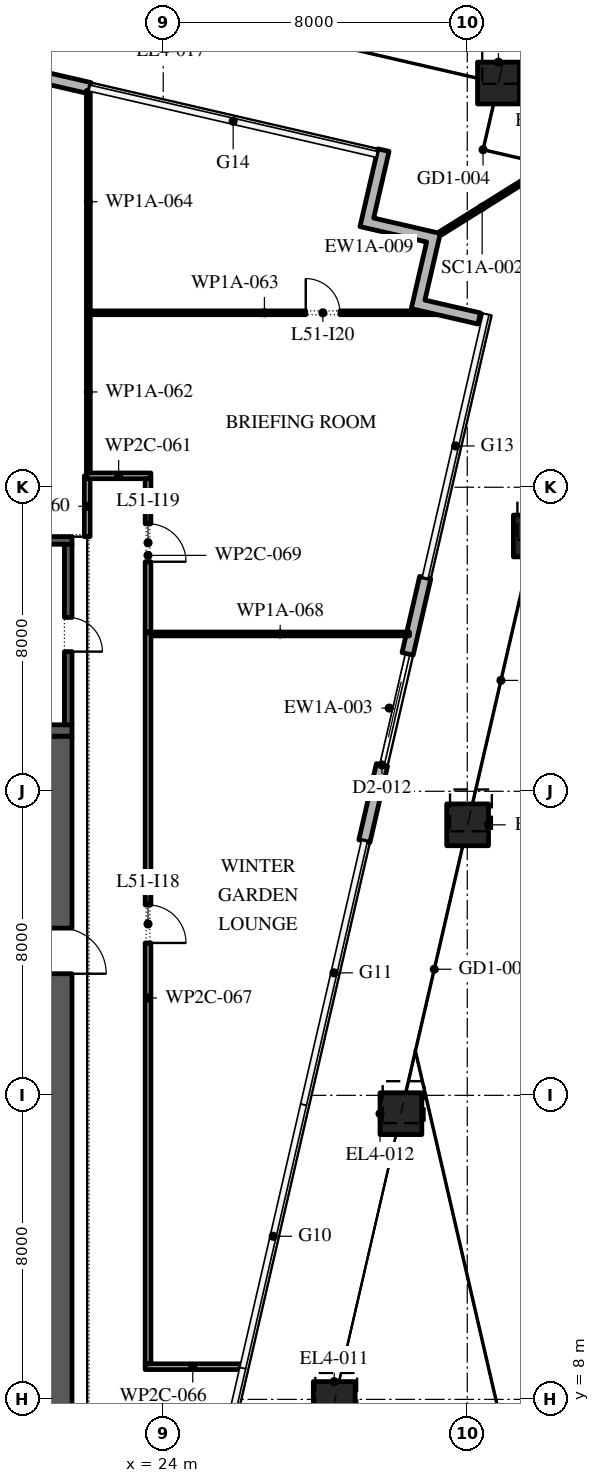
"""IFC4 building model, lengths in metres.
Left out: names, types, materials, properties, quantities, classifications, styles, units other than length and angle.
Written with IfcOpenShell. Run it as: python <this file> out.ifc"""

import sys

from ifc_helpers import new_model, si_unit, direction, frame, frame_2d, origin, origin_2d, place, context, subcontext, project, spatial, polyline, rectangle, outline, extrude, element, fill, save


model = new_model("IFC4")
c1 = context("Model", 3, precision=1e-05, world=origin(), true_north=direction((0.0, 1.0)))
c2 = subcontext(c1, "Body", "Model", "MODEL_VIEW")
j1 = project(units=[si_unit("LENGTHUNIT", "METRE"), si_unit("PLANEANGLEUNIT", "RADIAN")], contexts=[c1])
p1 = place(None, origin())
s1 = spatial("IfcSite", under=j1, at=p1, CompositionType="ELEMENT")
p2 = place(p1, origin())
s2 = spatial("IfcBuilding", under=s1, at=p2, CompositionType="ELEMENT")
p3 = place(p2, frame((0.0, 0.0, 237.0)))
s3 = spatial("IfcBuildingStorey", under=s2, at=p3, CompositionType="ELEMENT", Elevation=237.0)
p4 = place(p3, frame((28.5, 7.918, 0.0), z_axis=(0.008741740851, 0.037935089368, 0.999241968175), x_axis=(-0.974461559539, 0.224554378672, 0.0)))
e1 = element("IfcColumn", 1, at=p4, inside=s3, PredefinedType="COLUMN", context=c2, shape_type="SweptSolid", body=[
    extrude(rectangle(XDim=1.1, YDim=1.1, at=origin_2d()), origin(), (0.0, 0.0, 1.0), 6.005),
])
p5 = place(p3, frame((30.255, 15.518, 0.0), z_axis=(0.01166233446, 0.050550327764, 0.998653420521), x_axis=(-0.974404395419, 0.224802300229, 0.0)))
e2 = element("IfcColumn", 2, at=p5, inside=s3, PredefinedType="COLUMN", context=c2, shape_type="SweptSolid", body=[
    extrude(rectangle(XDim=1.1, YDim=1.1, at=origin_2d()), origin(), (0.0, 0.0, 1.0), 6.008),
])
p6 = place(p3, frame((32.009, 23.118, 0.0), z_axis=(0.014536448965, 0.063140162405, 0.997898798247), x_axis=(-0.974507250238, 0.224356010023, 0.0)))
e3 = element("IfcColumn", 3, at=p6, inside=s3, PredefinedType="COLUMN", context=c2, shape_type="SweptSolid", body=[
    extrude(rectangle(XDim=1.1, YDim=1.1, at=origin_2d()), origin(), (0.0, 0.0, 1.0), 6.013),
])
p7 = place(p3, frame((33.764, 30.718, 0.0), z_axis=(0.017443872675, 0.075698293979, 0.996978174081), x_axis=(-0.974461559539, 0.224554378672, 0.0)))
e4 = element("IfcColumn", 4, at=p7, inside=s3, PredefinedType="COLUMN", context=c2, shape_type="SweptSolid", body=[
    extrude(rectangle(XDim=1.1, YDim=1.1, at=origin_2d()), origin(), (0.0, 0.0, 1.0), 6.018),
])
p8 = place(p3, frame((32.821, 42.635, 0.0), z_axis=(0.020342549083, 0.088218584371, 0.995893398948), x_axis=(-0.97442890123, 0.224696053476, 0.0)))
e5 = element("IfcColumn", 5, at=p8, inside=s3, PredefinedType="COLUMN", context=c2, shape_type="SweptSolid", body=[
    extrude(rectangle(XDim=1.1, YDim=1.1, at=origin_2d()), origin(), (0.0, 0.0, 1.0), 6.025),
])
p9 = place(p3, frame((29.293, 22.689, 0.0), z_axis=(0.0, 0.0, 1.0), x_axis=(0.224949733175, 0.9743703698, 0.0)))
e6 = element("IfcWall", 6, at=p9, inside=s3, PredefinedType="STANDARD", context=c2, shape_type="SweptSolid", body=[
    extrude(rectangle(XDim=7.114, YDim=0.3, at=frame_2d((3.557, 0.0))), origin(), (0.0, 0.0, 1.0), 5.8),
])
p10 = place(p9, frame((2.057, 0.0, 0.0)))
e7 = element("IfcOpeningElement", 7, at=p10, cuts=e6, PredefinedType="OPENING", context=c2, shape_type="SweptSolid", body=[
    extrude(rectangle(XDim=3.0, YDim=3.5, at=frame_2d((1.5, 1.75))), frame((0.0, 0.16, 0.0), z_axis=(0.0, -1.0, 0.0), x_axis=(1.0, 0.0, 0.0)), (0.0, 0.0, 1.0), 0.32),
])
p11 = place(p3, frame((22.065, 42.502, 0.0), z_axis=(0.0, 0.0, 1.0), x_axis=(-0.974372279954, 0.224941459176, 0.0)))
e8 = element("IfcWall", 8, at=p11, inside=s3, PredefinedType="STANDARD", context=c2, shape_type="SweptSolid", body=[
    extrude(rectangle(XDim=8.05, YDim=0.3, at=frame_2d((4.025, 0.0))), origin(), (0.0, 0.0, 1.0), 5.8),
])
p12 = place(p11, frame((1.625, 0.0, 0.0)))
e9 = element("IfcOpeningElement", 9, at=p12, cuts=e8, PredefinedType="OPENING", context=c2, shape_type="SweptSolid", body=[
    extrude(rectangle(XDim=3.0, YDim=3.5, at=frame_2d((1.5, 1.75))), frame((0.0, 0.16, 0.0), z_axis=(0.0, -1.0, 0.0), x_axis=(1.0, 0.0, 0.0)), (0.0, 0.0, 1.0), 0.32),
])
p13 = place(p3, origin())
e10 = element("IfcWall", 10, at=p13, inside=s3, PredefinedType="STANDARD", context=c2, shape_type="SweptSolid", body=[
    extrude(outline(polyline([(30.931, 38.453), (29.177, 38.858), (29.65, 40.905), (29.942, 40.837), (29.537, 39.083), (31.291, 38.678), (30.886, 36.924), (32.348, 36.587), (32.28, 36.295), (30.526, 36.699), (30.931, 38.453)])), origin(), (0.0, 0.0, 1.0), 5.8),
])
p14 = place(p3, frame((31.291, 38.678, 0.0), z_axis=(0.0, 0.0, 1.0), x_axis=(0.84807753525, 0.529872148923, 0.0)))
e11 = element("IfcWall", 11, at=p14, inside=s3, PredefinedType="STANDARD", context=c2, shape_type="SweptSolid", body=[
    extrude(rectangle(XDim=2.596, YDim=0.1, at=frame_2d((1.298, 0.0))), origin(), (0.0, 0.0, 1.0), 5.8),
])
p15 = place(p3, frame((21.3, -2.45, 0.0), z_axis=(0.0, 0.0, 1.0), x_axis=(0.0, 1.0, 0.0)))
e12 = element("IfcWall", 12, at=p15, inside=s3, PredefinedType="SHEAR", context=c2, shape_type="SweptSolid", body=[
    extrude(rectangle(XDim=27.9, YDim=0.6, at=frame_2d((13.95, 0.0))), origin(), (0.0, 0.0, 1.0), 5.8),
])
p16 = place(p15, frame((5.05, 0.0, 0.0)))
e13 = element("IfcOpeningElement", 13, at=p16, cuts=e12, PredefinedType="OPENING", context=c2, shape_type="SweptSolid", body=[
    extrude(rectangle(XDim=1.2, YDim=2.1, at=frame_2d((0.6, 1.05))), frame((0.0, 0.31, 0.0), z_axis=(0.0, -1.0, 0.0), x_axis=(1.0, 0.0, 0.0)), (0.0, 0.0, 1.0), 0.62),
])
p17 = place(p15, frame((21.65, 0.0, 0.0)))
e14 = element("IfcOpeningElement", 14, at=p17, cuts=e12, PredefinedType="OPENING", context=c2, shape_type="SweptSolid", body=[
    extrude(rectangle(XDim=1.2, YDim=2.1, at=frame_2d((0.6, 1.05))), frame((0.0, 0.31, 0.0), z_axis=(0.0, -1.0, 0.0), x_axis=(1.0, 0.0, 0.0)), (0.0, 0.0, 1.0), 0.62),
])
p18 = place(p3, frame((10.4, 25.6, 0.0), z_axis=(0.0, 0.0, 1.0), x_axis=(1.0, 0.0, 0.0)))
e15 = element("IfcWall", 15, at=p18, inside=s3, PredefinedType="SHEAR", context=c2, shape_type="SweptSolid", body=[
    extrude(rectangle(XDim=11.2, YDim=0.3, at=frame_2d((5.6, 0.0))), origin(), (0.0, 0.0, 1.0), 5.8),
])
p19 = place(p3, frame((21.5, 25.75, 0.0), z_axis=(0.0, 0.0, 1.0), x_axis=(0.0, 1.0, 0.0)))
e16 = element("IfcWall", 16, at=p19, inside=s3, PredefinedType="SHEAR", context=c2, shape_type="SweptSolid", body=[
    extrude(rectangle(XDim=4.75, YDim=0.2, at=frame_2d((2.375, 0.0))), origin(), (0.0, 0.0, 1.0), 5.8),
])
p20 = place(p19, frame((1.925, 0.0, 0.0)))
e17 = element("IfcOpeningElement", 17, at=p20, cuts=e16, PredefinedType="OPENING", context=c2, shape_type="SweptSolid", body=[
    extrude(rectangle(XDim=0.9, YDim=2.1, at=frame_2d((0.45, 1.05))), frame((0.0, 0.11, 0.0), z_axis=(0.0, -1.0, 0.0), x_axis=(1.0, 0.0, 0.0)), (0.0, 0.0, 1.0), 0.22),
])
p21 = place(p3, frame((10.4, 30.6, 0.0), z_axis=(0.0, 0.0, 1.0), x_axis=(1.0, 0.0, 0.0)))
e18 = element("IfcWall", 18, at=p21, inside=s3, PredefinedType="SHEAR", context=c2, shape_type="SweptSolid", body=[
    extrude(rectangle(XDim=11.2, YDim=0.2, at=frame_2d((5.6, 0.0))), origin(), (0.0, 0.0, 1.0), 5.8),
])
p22 = place(p3, frame((22.0, 30.7, 0.0), z_axis=(0.0, 0.0, 1.0), x_axis=(0.0, 1.0, 0.0)))
e19 = element("IfcWall", 19, at=p22, inside=s3, PredefinedType="PARTITIONING", context=c2, shape_type="SweptSolid", body=[
    extrude(rectangle(XDim=1.6, YDim=0.15, at=frame_2d((0.8, 0.0))), origin(), (0.0, 0.0, 1.0), 5.8),
])
p23 = place(p3, frame((21.98, 32.3, 0.0), z_axis=(0.0, 0.0, 1.0), x_axis=(1.0, 0.0, 0.0)))
e20 = element("IfcWall", 20, at=p23, inside=s3, PredefinedType="PARTITIONING", context=c2, shape_type="SweptSolid", body=[
    extrude(rectangle(XDim=1.695, YDim=0.15, at=frame_2d((0.848, 0.0))), origin(), (0.0, 0.0, 1.0), 5.8),
])
p24 = place(p3, frame((22.03, 36.64, 0.0), z_axis=(0.0, 0.0, 1.0), x_axis=(0.0, -1.0, 0.0)))
e21 = element("IfcWall", 21, at=p24, inside=s3, PredefinedType="PARTITIONING", context=c2, shape_type="SweptSolid", body=[
    extrude(rectangle(XDim=4.265, YDim=0.1, at=frame_2d((2.132, 0.0))), origin(), (0.0, 0.0, 1.0), 5.8),
])
p25 = place(p3, frame((22.08, 36.59, 0.0), z_axis=(0.0, 0.0, 1.0), x_axis=(1.0, 0.0, 0.0)))
e22 = element("IfcWall", 22, at=p25, inside=s3, PredefinedType="PARTITIONING", context=c2, shape_type="SweptSolid", body=[
    extrude(rectangle(XDim=9.165, YDim=0.1, at=frame_2d((4.583, 0.0))), origin(), (0.0, 0.0, 1.0), 5.8),
])
p26 = place(p25, frame((5.67, 0.0, 0.0)))
e23 = element("IfcOpeningElement", 23, at=p26, cuts=e22, PredefinedType="OPENING", context=c2, shape_type="SweptSolid", body=[
    extrude(rectangle(XDim=0.9, YDim=2.1, at=frame_2d((0.45, 1.05))), frame((0.0, 0.06, 0.0), z_axis=(0.0, -1.0, 0.0), x_axis=(1.0, 0.0, 0.0)), (0.0, 0.0, 1.0), 0.12),
])
p27 = place(p3, frame((22.03, 42.438, 0.0), z_axis=(0.0, 0.0, 1.0), x_axis=(0.0, -1.0, 0.0)))
e24 = element("IfcWall", 24, at=p27, inside=s3, PredefinedType="PARTITIONING", context=c2, shape_type="SweptSolid", body=[
    extrude(rectangle(XDim=5.848, YDim=0.1, at=frame_2d((2.924, 0.0))), origin(), (0.0, 0.0, 1.0), 5.8),
])
p28 = place(p3, frame((23.525, 8.86, 0.0), z_axis=(0.0, 0.0, 1.0), x_axis=(1.0, 0.0, 0.0)))
e25 = element("IfcWall", 25, at=p28, inside=s3, PredefinedType="PARTITIONING", context=c2, shape_type="SweptSolid", body=[
    extrude(rectangle(XDim=2.504, YDim=0.15, at=frame_2d((1.252, 0.0))), origin(), (0.0, 0.0, 1.0), 5.8),
])
p29 = place(p3, frame((23.6, 28.19, 0.0), z_axis=(0.0, 0.0, 1.0), x_axis=(0.0, -1.0, 0.0)))
e26 = element("IfcWall", 26, at=p29, inside=s3, PredefinedType="PARTITIONING", context=c2, shape_type="SweptSolid", body=[
    extrude(rectangle(XDim=19.255, YDim=0.15, at=frame_2d((9.627, 0.0))), origin(), (0.0, 0.0, 1.0), 5.8),
])
p30 = place(p29, frame((7.18, 0.0, 0.0)))
e27 = element("IfcOpeningElement", 27, at=p30, cuts=e26, PredefinedType="OPENING", context=c2, shape_type="SweptSolid", body=[
    extrude(rectangle(XDim=1.0, YDim=2.1, at=frame_2d((0.5, 1.05))), frame((0.0, 0.085, 0.0), z_axis=(0.0, -1.0, 0.0), x_axis=(1.0, 0.0, 0.0)), (0.0, 0.0, 1.0), 0.17),
])
p31 = place(p3, frame((23.675, 28.14, 0.0), z_axis=(0.0, 0.0, 1.0), x_axis=(1.0, 0.0, 0.0)))
e28 = element("IfcWall", 28, at=p31, inside=s3, PredefinedType="PARTITIONING", context=c2, shape_type="SweptSolid", body=[
    extrude(rectangle(XDim=6.805, YDim=0.1, at=frame_2d((3.402, 0.0))), origin(), (0.0, 0.0, 1.0), 5.8),
])
p32 = place(p3, frame((23.6, 32.225, 0.0), z_axis=(0.0, 0.0, 1.0), x_axis=(0.0, -1.0, 0.0)))
e29 = element("IfcWall", 29, at=p32, inside=s3, PredefinedType="PARTITIONING", context=c2, shape_type="SweptSolid", body=[
    extrude(rectangle(XDim=4.035, YDim=0.15, at=frame_2d((2.018, 0.0))), origin(), (0.0, 0.0, 1.0), 5.8),
])
p33 = place(p32, frame((1.185, 0.0, 0.0)))
e30 = element("IfcOpeningElement", 30, at=p33, cuts=e29, PredefinedType="OPENING", context=c2, shape_type="SweptSolid", body=[
    extrude(rectangle(XDim=1.0, YDim=2.1, at=frame_2d((0.5, 1.05))), frame((0.0, 0.085, 0.0), z_axis=(0.0, -1.0, 0.0), x_axis=(1.0, 0.0, 0.0)), (0.0, 0.0, 1.0), 0.17),
])
p34 = place(p10, origin())
e31 = element("IfcDoor", 31, at=p34, inside=s3, OperationType="DOUBLE_DOOR_SLIDING", PredefinedType="DOOR", context=c2, shape_type="SweptSolid", body=[
    extrude(rectangle(XDim=3.0, YDim=3.5, at=frame_2d((1.5, 1.75))), frame((0.0, 0.025, 0.0), z_axis=(0.0, -1.0, 0.0), x_axis=(1.0, 0.0, 0.0)), (0.0, 0.0, 1.0), 0.05),
])
fill(e7, e31)
p35 = place(p17, frame((1.2, 0.0, 0.0), z_axis=(0.0, 0.0, 1.0), x_axis=(-1.0, 0.0, 0.0)))
e32 = element("IfcDoor", 32, at=p35, inside=s3, OperationType="SINGLE_SWING_LEFT", PredefinedType="DOOR", context=c2, shape_type="SweptSolid", body=[
    extrude(rectangle(XDim=1.2, YDim=2.1, at=frame_2d((0.6, 1.05))), frame((0.0, 0.025, 0.0), z_axis=(0.0, -1.0, 0.0), x_axis=(1.0, 0.0, 0.0)), (0.0, 0.0, 1.0), 0.05),
])
fill(e14, e32)
p36 = place(p20, frame((0.9, 0.15, 0.0), z_axis=(0.0, 0.0, 1.0), x_axis=(-1.0, 0.0, 0.0)))
e33 = element("IfcDoor", 33, at=p36, inside=s3, OperationType="SINGLE_SWING_LEFT", PredefinedType="DOOR", context=c2, shape_type="SweptSolid", body=[
    extrude(rectangle(XDim=0.9, YDim=2.1, at=frame_2d((0.45, 1.05))), frame((0.0, 0.1, 0.0), z_axis=(0.0, -1.0, 0.0), x_axis=(1.0, 0.0, 0.0)), (0.0, 0.0, 1.0), 0.05),
])
fill(e17, e33)
p37 = place(p30, origin())
e34 = element("IfcDoor", 34, at=p37, inside=s3, OperationType="SINGLE_SWING_LEFT", PredefinedType="DOOR", context=c2, shape_type="SweptSolid", body=[
    extrude(rectangle(XDim=1.0, YDim=2.1, at=frame_2d((0.5, 1.05))), frame((0.0, 0.025, 0.0), z_axis=(0.0, -1.0, 0.0), x_axis=(1.0, 0.0, 0.0)), (0.0, 0.0, 1.0), 0.05),
])
fill(e27, e34)
p38 = place(p33, origin())
e35 = element("IfcDoor", 35, at=p38, inside=s3, OperationType="SINGLE_SWING_LEFT", PredefinedType="DOOR", context=c2, shape_type="SweptSolid", body=[
    extrude(rectangle(XDim=1.0, YDim=2.1, at=frame_2d((0.5, 1.05))), frame((0.0, 0.025, 0.0), z_axis=(0.0, -1.0, 0.0), x_axis=(1.0, 0.0, 0.0)), (0.0, 0.0, 1.0), 0.05),
])
fill(e30, e35)
p39 = place(p26, origin())
e36 = element("IfcDoor", 36, at=p39, inside=s3, OperationType="SINGLE_SWING_RIGHT", PredefinedType="DOOR", context=c2, shape_type="SweptSolid", body=[
    extrude(rectangle(XDim=0.9, YDim=2.1, at=frame_2d((0.45, 1.05))), frame((0.0, 0.025, 0.0), z_axis=(0.0, -1.0, 0.0), x_axis=(1.0, 0.0, 0.0)), (0.0, 0.0, 1.0), 0.05),
])
fill(e23, e36)
save(model, sys.argv[1])
